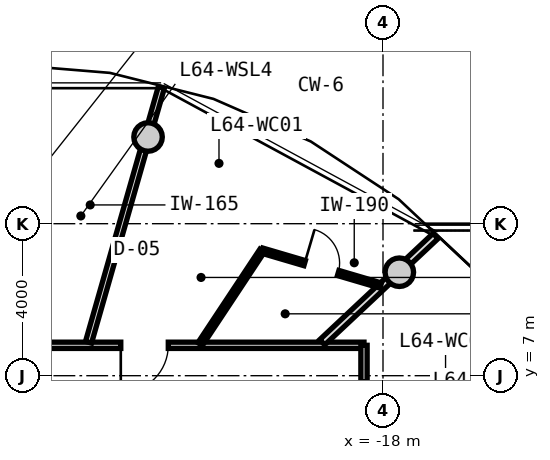
"""IFC4 building model, lengths in metres.
Left out: names, types, materials, properties, quantities, classifications, styles, units other than length and angle.
Written with IfcOpenShell. Run it as: python <this file> out.ifc"""

import sys

from ifc_helpers import new_model, si_unit, direction, frame, frame_2d, origin, origin_2d, place, context, subcontext, project, spatial, rectangle, circle, extrude, source, transform, mapped, element, fill, save


model = new_model("IFC4")
c1 = context("Model", 3, precision=1e-05, world=origin(), true_north=direction((0.0, 1.0)))
c2 = subcontext(c1, "Body", "Model", "MODEL_VIEW")
j1 = project(units=[si_unit("LENGTHUNIT", "METRE"), si_unit("PLANEANGLEUNIT", "RADIAN")], contexts=[c1])
p1 = place(None, origin())
s1 = spatial("IfcSite", under=j1, at=p1, CompositionType="ELEMENT")
p2 = place(p1, origin())
s2 = spatial("IfcBuilding", under=s1, at=p2, CompositionType="ELEMENT")
p3 = place(p2, frame((0.0, 0.0, 207.8)))
s3 = spatial("IfcBuildingStorey", under=s2, at=p3, CompositionType="ELEMENT", Elevation=207.8)
m1 = source(origin(), c2, "Body", "SweptSolid", [
    extrude(circle(Radius=0.375, at=origin_2d()), origin(), (0.0, 0.0, 1.0), 3.05),
])
for number, where, z_axis, x_axis in (
    (1, (-17.57, 9.723, 0.0), (0.0, 0.0, 1.0), (1.0, 0.0, 0.0)),
    (2, (-24.182, 13.281, 0.0), (0.0, 0.0, 1.0), (1.0, 0.0, 0.0)),
):
    element("IfcColumn", number, at=place(p3, frame(where, z_axis=z_axis, x_axis=x_axis)), inside=s3, PredefinedType="COLUMN", context=c2, shape_type="MappedRepresentation", body=[
        mapped(m1, transform((0.0, 0.0, 0.0), x_axis=(1.0, 0.0, 0.0), y_axis=(0.0, 1.0, 0.0), z_axis=(0.0, 0.0, 1.0), scale=1.0)),
    ])
m2 = source(origin(), c2, "Body", "SweptSolid", [
    extrude(rectangle(XDim=8.58, YDim=0.165, at=frame_2d((4.29, 0.0))), origin(), (0.0, 0.0, 1.0), 2.745),
])
p4 = place(p3, frame((-27.08, 7.8, 0.0), z_axis=(0.0, 0.0, 1.0), x_axis=(1.0, 0.0, 0.0)))
e3 = element("IfcWall", 3, at=p4, inside=s3, PredefinedType="PARTITIONING", context=c2, shape_type="MappedRepresentation", body=[
    mapped(m2, transform((0.0, 0.0, 0.0), x_axis=(1.0, 0.0, 0.0), y_axis=(0.0, 1.0, 0.0), z_axis=(0.0, 0.0, 1.0), scale=1.0)),
])
p5 = place(p4, frame((2.18, 0.0, 0.0)))
e4 = element("IfcOpeningElement", 4, at=p5, cuts=e3, PredefinedType="OPENING", context=c2, shape_type="SweptSolid", body=[
    extrude(rectangle(XDim=1.25, YDim=2.2, at=frame_2d((0.625, 1.1))), frame((0.0, 0.093, 0.0), z_axis=(0.0, -1.0, 0.0), x_axis=(1.0, 0.0, 0.0)), (0.0, 0.0, 1.0), 0.185),
])
m3 = source(origin(), c2, "Body", "SweptSolid", [
    extrude(rectangle(XDim=6.88, YDim=0.165, at=frame_2d((3.44, 0.0))), origin(), (0.0, 0.0, 1.0), 2.745),
])
p6 = place(p3, frame((-18.5, 7.8, 0.0), z_axis=(0.0, 0.0, 1.0), x_axis=(0.0, -1.0, 0.0)))
e5 = element("IfcWall", 5, at=p6, inside=s3, PredefinedType="PARTITIONING", context=c2, shape_type="MappedRepresentation", body=[
    mapped(m3, transform((0.0, 0.0, 0.0), x_axis=(1.0, 0.0, 0.0), y_axis=(0.0, 1.0, 0.0), z_axis=(0.0, 0.0, 1.0), scale=1.0)),
])
p7 = place(p6, frame((0.968, 0.0, 0.0)))
e6 = element("IfcOpeningElement", 6, at=p7, cuts=e5, PredefinedType="OPENING", context=c2, shape_type="SweptSolid", body=[
    extrude(rectangle(XDim=1.25, YDim=2.2, at=frame_2d((0.625, 1.1))), frame((0.0, 0.093, 0.0), z_axis=(0.0, -1.0, 0.0), x_axis=(1.0, 0.0, 0.0)), (0.0, 0.0, 1.0), 0.185),
])
m4 = source(origin(), c2, "Body", "SweptSolid", [
    extrude(rectangle(XDim=6.974, YDim=0.165, at=frame_2d((3.487, 0.0))), origin(), (0.0, 0.0, 1.0), 2.345),
])
p8 = place(p3, frame((-25.749, 7.88, 0.0), z_axis=(0.0, 0.0, 1.0), x_axis=(0.274707256801, 0.961527910703, 0.0)))
e7 = element("IfcWall", 7, at=p8, inside=s3, PredefinedType="PARTITIONING", context=c2, shape_type="MappedRepresentation", body=[
    mapped(m4, transform((0.0, 0.0, 0.0), x_axis=(1.0, 0.0, 0.0), y_axis=(0.0, 1.0, 0.0), z_axis=(0.0, 0.0, 1.0), scale=1.0)),
])
m5 = source(origin(), c2, "Body", "SweptSolid", [
    extrude(rectangle(XDim=4.089, YDim=0.19, at=frame_2d((2.044, 0.0))), origin(), (0.0, 0.0, 1.0), 2.345),
])
p9 = place(p3, frame((-19.598, 7.88, 0.0), z_axis=(0.0, 0.0, 1.0), x_axis=(0.729401273609, 0.684086092577, 0.0)))
e8 = element("IfcWall", 8, at=p9, inside=s3, PredefinedType="PARTITIONING", context=c2, shape_type="MappedRepresentation", body=[
    mapped(m5, transform((0.0, 0.0, 0.0), x_axis=(1.0, 0.0, 0.0), y_axis=(0.0, 1.0, 0.0), z_axis=(0.0, 0.0, 1.0), scale=1.0)),
])
m6 = source(origin(), c2, "Body", "SweptSolid", [
    extrude(rectangle(XDim=2.953, YDim=0.14, at=frame_2d((1.476, 0.0))), origin(), (0.0, 0.0, 1.0), 2.745),
])
p10 = place(p3, frame((-22.812, 7.83, 0.0), z_axis=(0.0, 0.0, 1.0), x_axis=(0.552427436518, 0.833560991999, 0.0)))
e9 = element("IfcWall", 9, at=p10, inside=s3, PredefinedType="PARTITIONING", context=c2, shape_type="MappedRepresentation", body=[
    mapped(m6, transform((0.0, 0.0, 0.0), x_axis=(1.0, 0.0, 0.0), y_axis=(0.0, 1.0, 0.0), z_axis=(0.0, 0.0, 1.0), scale=1.0)),
])
m7 = source(origin(), c2, "Body", "SweptSolid", [
    extrude(rectangle(XDim=3.252, YDim=0.14, at=frame_2d((1.626, 0.0))), origin(), (0.0, 0.0, 1.0), 2.745),
])
p11 = place(p3, frame((-21.18, 10.291, 0.0), z_axis=(0.0, 0.0, 1.0), x_axis=(0.959294945864, -0.282406102695, 0.0)))
e10 = element("IfcWall", 10, at=p11, inside=s3, PredefinedType="PARTITIONING", context=c2, shape_type="MappedRepresentation", body=[
    mapped(m7, transform((0.0, 0.0, 0.0), x_axis=(1.0, 0.0, 0.0), y_axis=(0.0, 1.0, 0.0), z_axis=(0.0, 0.0, 1.0), scale=1.0)),
])
p12 = place(p11, frame((1.166, 0.0, 0.0)))
e11 = element("IfcOpeningElement", 11, at=p12, cuts=e10, PredefinedType="OPENING", context=c2, shape_type="SweptSolid", body=[
    extrude(rectangle(XDim=0.92, YDim=2.1, at=frame_2d((0.46, 1.05))), frame((0.0, 0.08, 0.0), z_axis=(0.0, -1.0, 0.0), x_axis=(1.0, 0.0, 0.0)), (0.0, 0.0, 1.0), 0.16),
])
m8 = source(origin(), c2, "Body", "SweptSolid", [
    extrude(rectangle(XDim=1.25, YDim=2.2, at=frame_2d((0.625, 1.1))), frame((0.0, 0.025, 0.0), z_axis=(0.0, -1.0, 0.0), x_axis=(1.0, 0.0, 0.0)), (0.0, 0.0, 1.0), 0.05),
])
p13 = place(p5, frame((1.25, 0.0, 0.0), z_axis=(0.0, 0.0, 1.0), x_axis=(-1.0, 0.0, 0.0)))
e12 = element("IfcDoor", 12, at=p13, inside=s3, OperationType="SINGLE_SWING_RIGHT", PredefinedType="DOOR", context=c2, shape_type="MappedRepresentation", body=[
    mapped(m8, transform((0.0, 0.0, 0.0), x_axis=(1.0, 0.0, 0.0), y_axis=(0.0, 1.0, 0.0), z_axis=(0.0, 0.0, 1.0), scale=1.0)),
])
fill(e4, e12)
m9 = source(origin(), c2, "Body", "SweptSolid", [
    extrude(rectangle(XDim=0.92, YDim=2.1, at=frame_2d((0.46, 1.05))), frame((0.0, 0.025, 0.0), z_axis=(0.0, -1.0, 0.0), x_axis=(1.0, 0.0, 0.0)), (0.0, 0.0, 1.0), 0.05),
])
p14 = place(p12, origin())
e13 = element("IfcDoor", 13, at=p14, inside=s3, OperationType="SINGLE_SWING_LEFT", PredefinedType="DOOR", context=c2, shape_type="MappedRepresentation", body=[
    mapped(m9, transform((0.0, 0.0, 0.0), x_axis=(1.0, 0.0, 0.0), y_axis=(0.0, 1.0, 0.0), z_axis=(0.0, 0.0, 1.0), scale=1.0)),
])
fill(e11, e13)
save(model, sys.argv[1])
